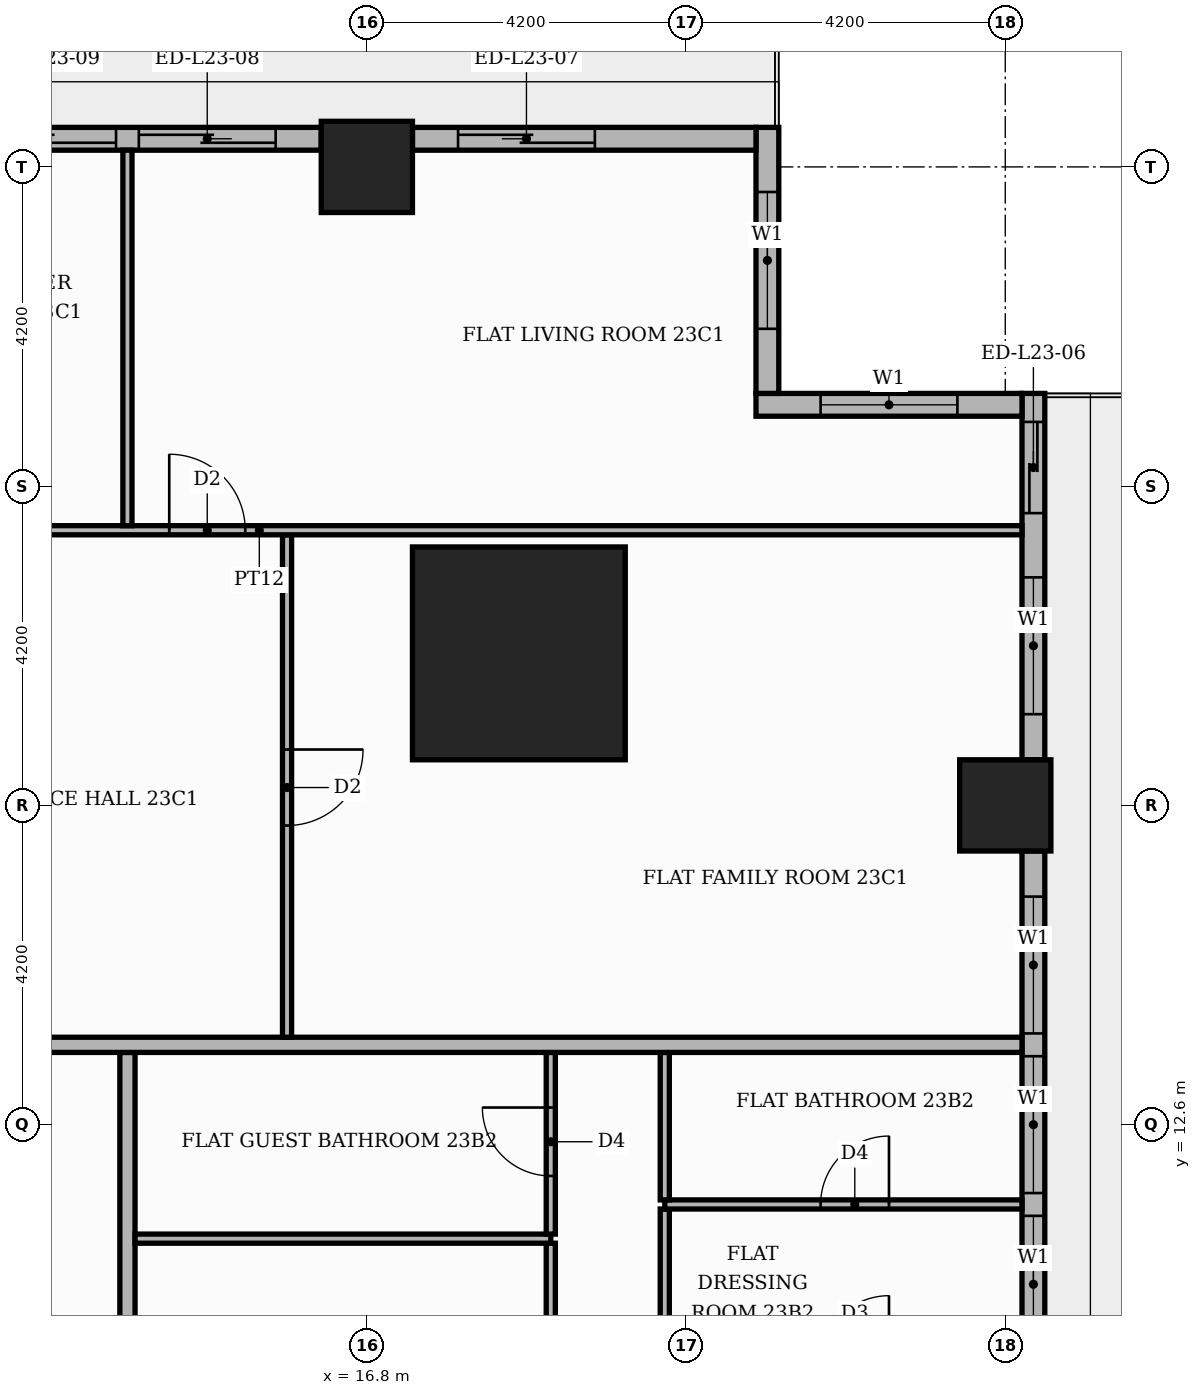
"""IFC4 building model, lengths in metres.
Left out: names, types, materials, properties, quantities, classifications, styles, units other than length and angle.
Written with IfcOpenShell. Run it as: python <this file> out.ifc"""

import sys

from ifc_helpers import new_model, si_unit, direction, frame, frame_2d, origin, origin_2d, place, context, subcontext, project, spatial, rectangle, extrude, element, fill, save


model = new_model("IFC4")
c1 = context("Model", 3, precision=1e-05, world=origin(), true_north=direction((0.0, 1.0)))
c2 = subcontext(c1, "Body", "Model", "MODEL_VIEW")
j1 = project(units=[si_unit("LENGTHUNIT", "METRE"), si_unit("PLANEANGLEUNIT", "RADIAN")], contexts=[c1])
p1 = place(None, origin())
s1 = spatial("IfcSite", under=j1, at=p1, CompositionType="ELEMENT")
p2 = place(p1, origin())
s2 = spatial("IfcBuilding", under=s1, at=p2, CompositionType="ELEMENT")
p3 = place(p2, frame((0.0, 0.0, 98.7)))
s3 = spatial("IfcBuildingStorey", under=s2, at=p3, CompositionType="ELEMENT", Elevation=98.7)
p4 = place(p3, frame((18.8, 18.8, 0.0), z_axis=(0.0, 0.0, 1.0), x_axis=(1.0, 0.0, 0.0)))
e1 = element("IfcColumn", 1, at=p4, inside=s3, PredefinedType="COLUMN", context=c2, shape_type="SweptSolid", body=[
    extrude(rectangle(XDim=2.8, YDim=2.8, at=origin_2d()), origin(), (0.0, 0.0, 1.0), 3.9),
])
for number, where, z_axis, x_axis in (
    (2, (25.2, 16.8, 0.0), (0.0, 0.0, 1.0), (1.0, 0.0, 0.0)),
    (3, (16.8, 25.2, 0.0), (0.0, 0.0, 1.0), (1.0, 0.0, 0.0)),
):
    element("IfcColumn", number, at=place(p3, frame(where, z_axis=z_axis, x_axis=x_axis)), inside=s3, PredefinedType="COLUMN", context=c2, shape_type="SweptSolid", body=[
        extrude(rectangle(XDim=1.2, YDim=1.2, at=origin_2d()), origin(), (0.0, 0.0, 1.0), 3.9),
    ])
p5 = place(p3, frame((25.57, 9.0, 0.0), z_axis=(0.0, 0.0, 1.0), x_axis=(0.0, 1.0, 0.0)))
e4 = element("IfcWall", 4, at=p5, inside=s3, PredefinedType="STANDARD", context=c2, shape_type="SweptSolid", body=[
    extrude(rectangle(XDim=7.2, YDim=0.3, at=frame_2d((3.6, 0.0))), origin(), (0.0, 0.0, 1.0), 3.48),
])
p6 = place(p5, frame((0.6, 0.0, 0.9)))
e5 = element("IfcOpeningElement", 5, at=p6, cuts=e4, PredefinedType="OPENING", context=c2, shape_type="SweptSolid", body=[
    extrude(rectangle(XDim=1.8, YDim=2.1, at=frame_2d((0.9, 1.05))), frame((0.0, 0.16, 0.0), z_axis=(0.0, -1.0, 0.0), x_axis=(1.0, 0.0, 0.0)), (0.0, 0.0, 1.0), 0.32),
])
p7 = place(p5, frame((2.7, 0.0, 0.9)))
e6 = element("IfcOpeningElement", 6, at=p7, cuts=e4, PredefinedType="OPENING", context=c2, shape_type="SweptSolid", body=[
    extrude(rectangle(XDim=1.8, YDim=2.1, at=frame_2d((0.9, 1.05))), frame((0.0, 0.16, 0.0), z_axis=(0.0, -1.0, 0.0), x_axis=(1.0, 0.0, 0.0)), (0.0, 0.0, 1.0), 0.32),
])
p8 = place(p5, frame((4.8, 0.0, 0.9)))
e7 = element("IfcOpeningElement", 7, at=p8, cuts=e4, PredefinedType="OPENING", context=c2, shape_type="SweptSolid", body=[
    extrude(rectangle(XDim=1.8, YDim=2.1, at=frame_2d((0.9, 1.05))), frame((0.0, 0.16, 0.0), z_axis=(0.0, -1.0, 0.0), x_axis=(1.0, 0.0, 0.0)), (0.0, 0.0, 1.0), 0.32),
])
p9 = place(p3, frame((25.57, 17.4, 0.0), z_axis=(0.0, 0.0, 1.0), x_axis=(0.0, 1.0, 0.0)))
e8 = element("IfcWall", 8, at=p9, inside=s3, PredefinedType="STANDARD", context=c2, shape_type="SweptSolid", body=[
    extrude(rectangle(XDim=4.82, YDim=0.3, at=frame_2d((2.41, 0.0))), origin(), (0.0, 0.0, 1.0), 3.48),
])
p10 = place(p9, frame((0.6, 0.0, 0.9)))
e9 = element("IfcOpeningElement", 9, at=p10, cuts=e8, PredefinedType="OPENING", context=c2, shape_type="SweptSolid", body=[
    extrude(rectangle(XDim=1.8, YDim=2.1, at=frame_2d((0.9, 1.05))), frame((0.0, 0.16, 0.0), z_axis=(0.0, -1.0, 0.0), x_axis=(1.0, 0.0, 0.0)), (0.0, 0.0, 1.0), 0.32),
])
p11 = place(p9, frame((3.245, 0.0, 0.0)))
e10 = element("IfcOpeningElement", 10, at=p11, cuts=e8, PredefinedType="OPENING", context=c2, shape_type="SweptSolid", body=[
    extrude(rectangle(XDim=1.2, YDim=2.4, at=frame_2d((0.6, 1.2))), frame((0.0, 0.16, 0.0), z_axis=(0.0, -1.0, 0.0), x_axis=(1.0, 0.0, 0.0)), (0.0, 0.0, 1.0), 0.32),
])
p12 = place(p3, frame((25.42, 22.07, 0.0), z_axis=(0.0, 0.0, 1.0), x_axis=(-1.0, 0.0, 0.0)))
e11 = element("IfcWall", 11, at=p12, inside=s3, PredefinedType="STANDARD", context=c2, shape_type="SweptSolid", body=[
    extrude(rectangle(XDim=3.5, YDim=0.3, at=frame_2d((1.75, 0.0))), origin(), (0.0, 0.0, 1.0), 3.48),
])
p13 = place(p12, frame((0.85, 0.0, 0.9)))
e12 = element("IfcOpeningElement", 12, at=p13, cuts=e11, PredefinedType="OPENING", context=c2, shape_type="SweptSolid", body=[
    extrude(rectangle(XDim=1.8, YDim=2.1, at=frame_2d((0.9, 1.05))), frame((0.0, 0.16, 0.0), z_axis=(0.0, -1.0, 0.0), x_axis=(1.0, 0.0, 0.0)), (0.0, 0.0, 1.0), 0.32),
])
p14 = place(p3, frame((22.07, 22.22, 0.0), z_axis=(0.0, 0.0, 1.0), x_axis=(0.0, 1.0, 0.0)))
e13 = element("IfcWall", 13, at=p14, inside=s3, PredefinedType="STANDARD", context=c2, shape_type="SweptSolid", body=[
    extrude(rectangle(XDim=3.5, YDim=0.3, at=frame_2d((1.75, 0.0))), origin(), (0.0, 0.0, 1.0), 3.48),
])
p15 = place(p14, frame((0.85, 0.0, 0.9)))
e14 = element("IfcOpeningElement", 14, at=p15, cuts=e13, PredefinedType="OPENING", context=c2, shape_type="SweptSolid", body=[
    extrude(rectangle(XDim=1.8, YDim=2.1, at=frame_2d((0.9, 1.05))), frame((0.0, 0.16, 0.0), z_axis=(0.0, -1.0, 0.0), x_axis=(1.0, 0.0, 0.0)), (0.0, 0.0, 1.0), 0.32),
])
p16 = place(p3, frame((21.92, 25.57, 0.0), z_axis=(0.0, 0.0, 1.0), x_axis=(-1.0, 0.0, 0.0)))
e15 = element("IfcWall", 15, at=p16, inside=s3, PredefinedType="STANDARD", context=c2, shape_type="SweptSolid", body=[
    extrude(rectangle(XDim=4.52, YDim=0.3, at=frame_2d((2.26, 0.0))), origin(), (0.0, 0.0, 1.0), 3.48),
])
p17 = place(p16, frame((2.12, 0.0, 0.0)))
e16 = element("IfcOpeningElement", 16, at=p17, cuts=e15, PredefinedType="OPENING", context=c2, shape_type="SweptSolid", body=[
    extrude(rectangle(XDim=1.8, YDim=2.4, at=frame_2d((0.9, 1.2))), frame((0.0, 0.16, 0.0), z_axis=(0.0, -1.0, 0.0), x_axis=(1.0, 0.0, 0.0)), (0.0, 0.0, 1.0), 0.32),
])
p18 = place(p3, frame((16.2, 25.57, 0.0), z_axis=(0.0, 0.0, 1.0), x_axis=(-1.0, 0.0, 0.0)))
e17 = element("IfcWall", 17, at=p18, inside=s3, PredefinedType="STANDARD", context=c2, shape_type="SweptSolid", body=[
    extrude(rectangle(XDim=7.2, YDim=0.3, at=frame_2d((3.6, 0.0))), origin(), (0.0, 0.0, 1.0), 3.48),
])
p19 = place(p18, frame((0.6, 0.0, 0.0)))
e18 = element("IfcOpeningElement", 18, at=p19, cuts=e17, PredefinedType="OPENING", context=c2, shape_type="SweptSolid", body=[
    extrude(rectangle(XDim=1.8, YDim=2.4, at=frame_2d((0.9, 1.2))), frame((0.0, 0.16, 0.0), z_axis=(0.0, -1.0, 0.0), x_axis=(1.0, 0.0, 0.0)), (0.0, 0.0, 1.0), 0.32),
])
p20 = place(p18, frame((2.7, 0.0, 0.0)))
e19 = element("IfcOpeningElement", 19, at=p20, cuts=e17, PredefinedType="OPENING", context=c2, shape_type="SweptSolid", body=[
    extrude(rectangle(XDim=1.8, YDim=2.4, at=frame_2d((0.9, 1.2))), frame((0.0, 0.16, 0.0), z_axis=(0.0, -1.0, 0.0), x_axis=(1.0, 0.0, 0.0)), (0.0, 0.0, 1.0), 0.32),
])
p21 = place(p18, frame((4.8, 0.0, 0.9)))
e20 = element("IfcOpeningElement", 20, at=p21, cuts=e17, PredefinedType="OPENING", context=c2, shape_type="SweptSolid", body=[
    extrude(rectangle(XDim=1.8, YDim=2.1, at=frame_2d((0.9, 1.05))), frame((0.0, 0.16, 0.0), z_axis=(0.0, -1.0, 0.0), x_axis=(1.0, 0.0, 0.0)), (0.0, 0.0, 1.0), 0.32),
])
p22 = place(p3, frame((13.65, -5.15, 0.0), z_axis=(0.0, 0.0, 1.0), x_axis=(0.0, 1.0, 0.0)))
e21 = element("IfcWall", 21, at=p22, inside=s3, PredefinedType="PARTITIONING", context=c2, shape_type="SweptSolid", body=[
    extrude(rectangle(XDim=18.7, YDim=0.2, at=frame_2d((9.35, 0.0))), origin(), (0.0, 0.0, 1.0), 3.48),
])
p23 = place(p22, frame((1.45, 0.0, 0.0)))
e22 = element("IfcOpeningElement", 22, at=p23, cuts=e21, PredefinedType="OPENING", context=c2, shape_type="SweptSolid", body=[
    extrude(rectangle(XDim=1.1, YDim=2.4, at=frame_2d((0.55, 1.2))), frame((0.0, 0.11, 0.0), z_axis=(0.0, -1.0, 0.0), x_axis=(1.0, 0.0, 0.0)), (0.0, 0.0, 1.0), 0.22),
])
p24 = place(p3, frame((19.22, 7.56, 0.0), z_axis=(0.0, 0.0, 1.0), x_axis=(0.0, 1.0, 0.0)))
e23 = element("IfcWall", 23, at=p24, inside=s3, PredefinedType="PARTITIONING", context=c2, shape_type="SweptSolid", body=[
    extrude(rectangle(XDim=3.48, YDim=0.12, at=frame_2d((1.74, 0.0))), origin(), (0.0, 0.0, 1.0), 3.48),
])
p25 = place(p24, frame((1.29, 0.0, 0.0)))
e24 = element("IfcOpeningElement", 24, at=p25, cuts=e23, PredefinedType="OPENING", context=c2, shape_type="SweptSolid", body=[
    extrude(rectangle(XDim=0.9, YDim=2.1, at=frame_2d((0.45, 1.05))), frame((0.0, 0.07, 0.0), z_axis=(0.0, -1.0, 0.0), x_axis=(1.0, 0.0, 0.0)), (0.0, 0.0, 1.0), 0.14),
])
p26 = place(p3, frame((20.72, 9.51, 0.0), z_axis=(0.0, 0.0, 1.0), x_axis=(0.0, 1.0, 0.0)))
e25 = element("IfcWall", 25, at=p26, inside=s3, PredefinedType="PARTITIONING", context=c2, shape_type="SweptSolid", body=[
    extrude(rectangle(XDim=1.98, YDim=0.12, at=frame_2d((0.99, 0.0))), origin(), (0.0, 0.0, 1.0), 3.48),
])
p27 = place(p3, frame((13.75, 11.1, 0.0), z_axis=(0.0, 0.0, 1.0), x_axis=(1.0, 0.0, 0.0)))
e26 = element("IfcWall", 26, at=p27, inside=s3, PredefinedType="PARTITIONING", context=c2, shape_type="SweptSolid", body=[
    extrude(rectangle(XDim=5.47, YDim=0.12, at=frame_2d((2.735, 0.0))), origin(), (0.0, 0.0, 1.0), 3.48),
])
p28 = place(p3, frame((19.22, 11.16, 0.0), z_axis=(0.0, 0.0, 1.0), x_axis=(0.0, 1.0, 0.0)))
e27 = element("IfcWall", 27, at=p28, inside=s3, PredefinedType="PARTITIONING", context=c2, shape_type="SweptSolid", body=[
    extrude(rectangle(XDim=2.39, YDim=0.12, at=frame_2d((1.195, 0.0))), origin(), (0.0, 0.0, 1.0), 3.48),
])
p29 = place(p28, frame((0.765, 0.0, 0.0)))
e28 = element("IfcOpeningElement", 28, at=p29, cuts=e27, PredefinedType="OPENING", context=c2, shape_type="SweptSolid", body=[
    extrude(rectangle(XDim=0.9, YDim=2.1, at=frame_2d((0.45, 1.05))), frame((0.0, 0.07, 0.0), z_axis=(0.0, -1.0, 0.0), x_axis=(1.0, 0.0, 0.0)), (0.0, 0.0, 1.0), 0.14),
])
p30 = place(p3, frame((20.72, 11.55, 0.0), z_axis=(0.0, 0.0, 1.0), x_axis=(1.0, 0.0, 0.0)))
e29 = element("IfcWall", 29, at=p30, inside=s3, PredefinedType="PARTITIONING", context=c2, shape_type="SweptSolid", body=[
    extrude(rectangle(XDim=4.7, YDim=0.12, at=frame_2d((2.35, 0.0))), origin(), (0.0, 0.0, 1.0), 3.48),
])
p31 = place(p30, frame((2.05, 0.0, 0.0)))
e30 = element("IfcOpeningElement", 30, at=p31, cuts=e29, PredefinedType="OPENING", context=c2, shape_type="SweptSolid", body=[
    extrude(rectangle(XDim=0.9, YDim=2.1, at=frame_2d((0.45, 1.05))), frame((0.0, 0.07, 0.0), z_axis=(0.0, -1.0, 0.0), x_axis=(1.0, 0.0, 0.0)), (0.0, 0.0, 1.0), 0.14),
])
p32 = place(p3, frame((20.72, 11.61, 0.0), z_axis=(0.0, 0.0, 1.0), x_axis=(0.0, 1.0, 0.0)))
e31 = element("IfcWall", 31, at=p32, inside=s3, PredefinedType="PARTITIONING", context=c2, shape_type="SweptSolid", body=[
    extrude(rectangle(XDim=1.94, YDim=0.12, at=frame_2d((0.97, 0.0))), origin(), (0.0, 0.0, 1.0), 3.48),
])
p33 = place(p3, frame((-13.65, 13.65, 0.0), z_axis=(0.0, 0.0, 1.0), x_axis=(1.0, 0.0, 0.0)))
e32 = element("IfcWall", 32, at=p33, inside=s3, PredefinedType="PARTITIONING", context=c2, shape_type="SweptSolid", body=[
    extrude(rectangle(XDim=39.07, YDim=0.2, at=frame_2d((19.535, 0.0))), origin(), (0.0, 0.0, 1.0), 3.48),
])
p34 = place(p33, frame((24.65, 0.0, 0.0)))
e33 = element("IfcOpeningElement", 33, at=p34, cuts=e32, PredefinedType="OPENING", context=c2, shape_type="SweptSolid", body=[
    extrude(rectangle(XDim=1.1, YDim=2.4, at=frame_2d((0.55, 1.2))), frame((0.0, 0.11, 0.0), z_axis=(0.0, -1.0, 0.0), x_axis=(1.0, 0.0, 0.0)), (0.0, 0.0, 1.0), 0.22),
])
p35 = place(p33, frame((14.15, 0.0, 0.0)))
e34 = element("IfcOpeningElement", 34, at=p35, cuts=e32, PredefinedType="OPENING", context=c2, shape_type="SweptSolid", body=[
    extrude(rectangle(XDim=1.1, YDim=2.4, at=frame_2d((0.55, 1.2))), frame((0.0, 0.11, 0.0), z_axis=(0.0, -1.0, 0.0), x_axis=(1.0, 0.0, 0.0)), (0.0, 0.0, 1.0), 0.22),
])
p36 = place(p3, frame((15.75, 13.75, 0.0), z_axis=(0.0, 0.0, 1.0), x_axis=(0.0, 1.0, 0.0)))
e35 = element("IfcWall", 35, at=p36, inside=s3, PredefinedType="PARTITIONING", context=c2, shape_type="SweptSolid", body=[
    extrude(rectangle(XDim=6.61, YDim=0.12, at=frame_2d((3.305, 0.0))), origin(), (0.0, 0.0, 1.0), 3.48),
])
p37 = place(p36, frame((2.785, 0.0, 0.0)))
e36 = element("IfcOpeningElement", 36, at=p37, cuts=e35, PredefinedType="OPENING", context=c2, shape_type="SweptSolid", body=[
    extrude(rectangle(XDim=1.0, YDim=2.1, at=frame_2d((0.5, 1.05))), frame((0.0, 0.07, 0.0), z_axis=(0.0, -1.0, 0.0), x_axis=(1.0, 0.0, 0.0)), (0.0, 0.0, 1.0), 0.14),
])
p38 = place(p3, frame((5.35, 20.42, 0.0), z_axis=(0.0, 0.0, 1.0), x_axis=(1.0, 0.0, 0.0)))
e37 = element("IfcWall", 37, at=p38, inside=s3, PredefinedType="PARTITIONING", context=c2, shape_type="SweptSolid", body=[
    extrude(rectangle(XDim=20.07, YDim=0.12, at=frame_2d((10.035, 0.0))), origin(), (0.0, 0.0, 1.0), 3.48),
])
p39 = place(p38, frame((8.85, 0.0, 0.0)))
e38 = element("IfcOpeningElement", 38, at=p39, cuts=e37, PredefinedType="OPENING", context=c2, shape_type="SweptSolid", body=[
    extrude(rectangle(XDim=1.0, YDim=2.1, at=frame_2d((0.5, 1.05))), frame((0.0, 0.07, 0.0), z_axis=(0.0, -1.0, 0.0), x_axis=(1.0, 0.0, 0.0)), (0.0, 0.0, 1.0), 0.14),
])
p40 = place(p38, frame((5.75, 0.0, 0.0)))
e39 = element("IfcOpeningElement", 39, at=p40, cuts=e37, PredefinedType="OPENING", context=c2, shape_type="SweptSolid", body=[
    extrude(rectangle(XDim=0.9, YDim=2.1, at=frame_2d((0.45, 1.05))), frame((0.0, 0.07, 0.0), z_axis=(0.0, -1.0, 0.0), x_axis=(1.0, 0.0, 0.0)), (0.0, 0.0, 1.0), 0.14),
])
p41 = place(p3, frame((13.65, 20.48, 0.0), z_axis=(0.0, 0.0, 1.0), x_axis=(0.0, 1.0, 0.0)))
e40 = element("IfcWall", 40, at=p41, inside=s3, PredefinedType="PARTITIONING", context=c2, shape_type="SweptSolid", body=[
    extrude(rectangle(XDim=4.94, YDim=0.12, at=frame_2d((2.47, 0.0))), origin(), (0.0, 0.0, 1.0), 3.48),
])
p42 = place(p6, origin())
e41 = element("IfcWindow", 41, at=p42, inside=s3, PartitioningType="SINGLE_PANEL", PredefinedType="WINDOW", context=c2, shape_type="SweptSolid", body=[
    extrude(rectangle(XDim=1.8, YDim=2.1, at=frame_2d((0.9, 1.05))), frame((0.0, 0.03, 0.0), z_axis=(0.0, -1.0, 0.0), x_axis=(1.0, 0.0, 0.0)), (0.0, 0.0, 1.0), 0.06),
])
fill(e5, e41)
p43 = place(p7, origin())
e42 = element("IfcWindow", 42, at=p43, inside=s3, PartitioningType="SINGLE_PANEL", PredefinedType="WINDOW", context=c2, shape_type="SweptSolid", body=[
    extrude(rectangle(XDim=1.8, YDim=2.1, at=frame_2d((0.9, 1.05))), frame((0.0, 0.03, 0.0), z_axis=(0.0, -1.0, 0.0), x_axis=(1.0, 0.0, 0.0)), (0.0, 0.0, 1.0), 0.06),
])
fill(e6, e42)
p44 = place(p8, origin())
e43 = element("IfcWindow", 43, at=p44, inside=s3, PartitioningType="SINGLE_PANEL", PredefinedType="WINDOW", context=c2, shape_type="SweptSolid", body=[
    extrude(rectangle(XDim=1.8, YDim=2.1, at=frame_2d((0.9, 1.05))), frame((0.0, 0.03, 0.0), z_axis=(0.0, -1.0, 0.0), x_axis=(1.0, 0.0, 0.0)), (0.0, 0.0, 1.0), 0.06),
])
fill(e7, e43)
p45 = place(p10, origin())
e44 = element("IfcWindow", 44, at=p45, inside=s3, PartitioningType="SINGLE_PANEL", PredefinedType="WINDOW", context=c2, shape_type="SweptSolid", body=[
    extrude(rectangle(XDim=1.8, YDim=2.1, at=frame_2d((0.9, 1.05))), frame((0.0, 0.03, 0.0), z_axis=(0.0, -1.0, 0.0), x_axis=(1.0, 0.0, 0.0)), (0.0, 0.0, 1.0), 0.06),
])
fill(e9, e44)
p46 = place(p11, origin())
e45 = element("IfcDoor", 45, at=p46, inside=s3, OperationType="SLIDING_TO_RIGHT", PredefinedType="DOOR", context=c2, shape_type="SweptSolid", body=[
    extrude(rectangle(XDim=1.2, YDim=2.4, at=frame_2d((0.6, 1.2))), frame((0.0, 0.025, 0.0), z_axis=(0.0, -1.0, 0.0), x_axis=(1.0, 0.0, 0.0)), (0.0, 0.0, 1.0), 0.05),
])
fill(e10, e45)
p47 = place(p13, origin())
e46 = element("IfcWindow", 46, at=p47, inside=s3, PartitioningType="SINGLE_PANEL", PredefinedType="WINDOW", context=c2, shape_type="SweptSolid", body=[
    extrude(rectangle(XDim=1.8, YDim=2.1, at=frame_2d((0.9, 1.05))), frame((0.0, 0.03, 0.0), z_axis=(0.0, -1.0, 0.0), x_axis=(1.0, 0.0, 0.0)), (0.0, 0.0, 1.0), 0.06),
])
fill(e12, e46)
p48 = place(p15, origin())
e47 = element("IfcWindow", 47, at=p48, inside=s3, PartitioningType="SINGLE_PANEL", PredefinedType="WINDOW", context=c2, shape_type="SweptSolid", body=[
    extrude(rectangle(XDim=1.8, YDim=2.1, at=frame_2d((0.9, 1.05))), frame((0.0, 0.03, 0.0), z_axis=(0.0, -1.0, 0.0), x_axis=(1.0, 0.0, 0.0)), (0.0, 0.0, 1.0), 0.06),
])
fill(e14, e47)
p49 = place(p17, origin())
e48 = element("IfcDoor", 48, at=p49, inside=s3, OperationType="SLIDING_TO_RIGHT", PredefinedType="DOOR", context=c2, shape_type="SweptSolid", body=[
    extrude(rectangle(XDim=1.8, YDim=2.4, at=frame_2d((0.9, 1.2))), frame((0.0, 0.025, 0.0), z_axis=(0.0, -1.0, 0.0), x_axis=(1.0, 0.0, 0.0)), (0.0, 0.0, 1.0), 0.05),
])
fill(e16, e48)
p50 = place(p19, origin())
e49 = element("IfcDoor", 49, at=p50, inside=s3, OperationType="SLIDING_TO_LEFT", PredefinedType="DOOR", context=c2, shape_type="SweptSolid", body=[
    extrude(rectangle(XDim=1.8, YDim=2.4, at=frame_2d((0.9, 1.2))), frame((0.0, 0.025, 0.0), z_axis=(0.0, -1.0, 0.0), x_axis=(1.0, 0.0, 0.0)), (0.0, 0.0, 1.0), 0.05),
])
fill(e18, e49)
p51 = place(p20, origin())
e50 = element("IfcDoor", 50, at=p51, inside=s3, OperationType="SLIDING_TO_RIGHT", PredefinedType="DOOR", context=c2, shape_type="SweptSolid", body=[
    extrude(rectangle(XDim=1.8, YDim=2.4, at=frame_2d((0.9, 1.2))), frame((0.0, 0.025, 0.0), z_axis=(0.0, -1.0, 0.0), x_axis=(1.0, 0.0, 0.0)), (0.0, 0.0, 1.0), 0.05),
])
fill(e19, e50)
p52 = place(p29, origin())
e51 = element("IfcDoor", 51, at=p52, inside=s3, OperationType="SINGLE_SWING_RIGHT", PredefinedType="DOOR", context=c2, shape_type="SweptSolid", body=[
    extrude(rectangle(XDim=0.9, YDim=2.1, at=frame_2d((0.45, 1.05))), frame((0.0, 0.025, 0.0), z_axis=(0.0, -1.0, 0.0), x_axis=(1.0, 0.0, 0.0)), (0.0, 0.0, 1.0), 0.05),
])
fill(e28, e51)
p53 = place(p31, origin())
e52 = element("IfcDoor", 52, at=p53, inside=s3, OperationType="SINGLE_SWING_RIGHT", PredefinedType="DOOR", context=c2, shape_type="SweptSolid", body=[
    extrude(rectangle(XDim=0.9, YDim=2.1, at=frame_2d((0.45, 1.05))), frame((0.0, 0.025, 0.0), z_axis=(0.0, -1.0, 0.0), x_axis=(1.0, 0.0, 0.0)), (0.0, 0.0, 1.0), 0.05),
])
fill(e30, e52)
p54 = place(p37, frame((1.0, 0.0, 0.0), z_axis=(0.0, 0.0, 1.0), x_axis=(-1.0, 0.0, 0.0)))
e53 = element("IfcDoor", 53, at=p54, inside=s3, OperationType="SINGLE_SWING_RIGHT", PredefinedType="DOOR", context=c2, shape_type="SweptSolid", body=[
    extrude(rectangle(XDim=1.0, YDim=2.1, at=frame_2d((0.5, 1.05))), frame((0.0, 0.025, 0.0), z_axis=(0.0, -1.0, 0.0), x_axis=(1.0, 0.0, 0.0)), (0.0, 0.0, 1.0), 0.05),
])
fill(e36, e53)
p55 = place(p39, origin())
e54 = element("IfcDoor", 54, at=p55, inside=s3, OperationType="SINGLE_SWING_LEFT", PredefinedType="DOOR", context=c2, shape_type="SweptSolid", body=[
    extrude(rectangle(XDim=1.0, YDim=2.1, at=frame_2d((0.5, 1.05))), frame((0.0, 0.025, 0.0), z_axis=(0.0, -1.0, 0.0), x_axis=(1.0, 0.0, 0.0)), (0.0, 0.0, 1.0), 0.05),
])
fill(e38, e54)
save(model, sys.argv[1])
